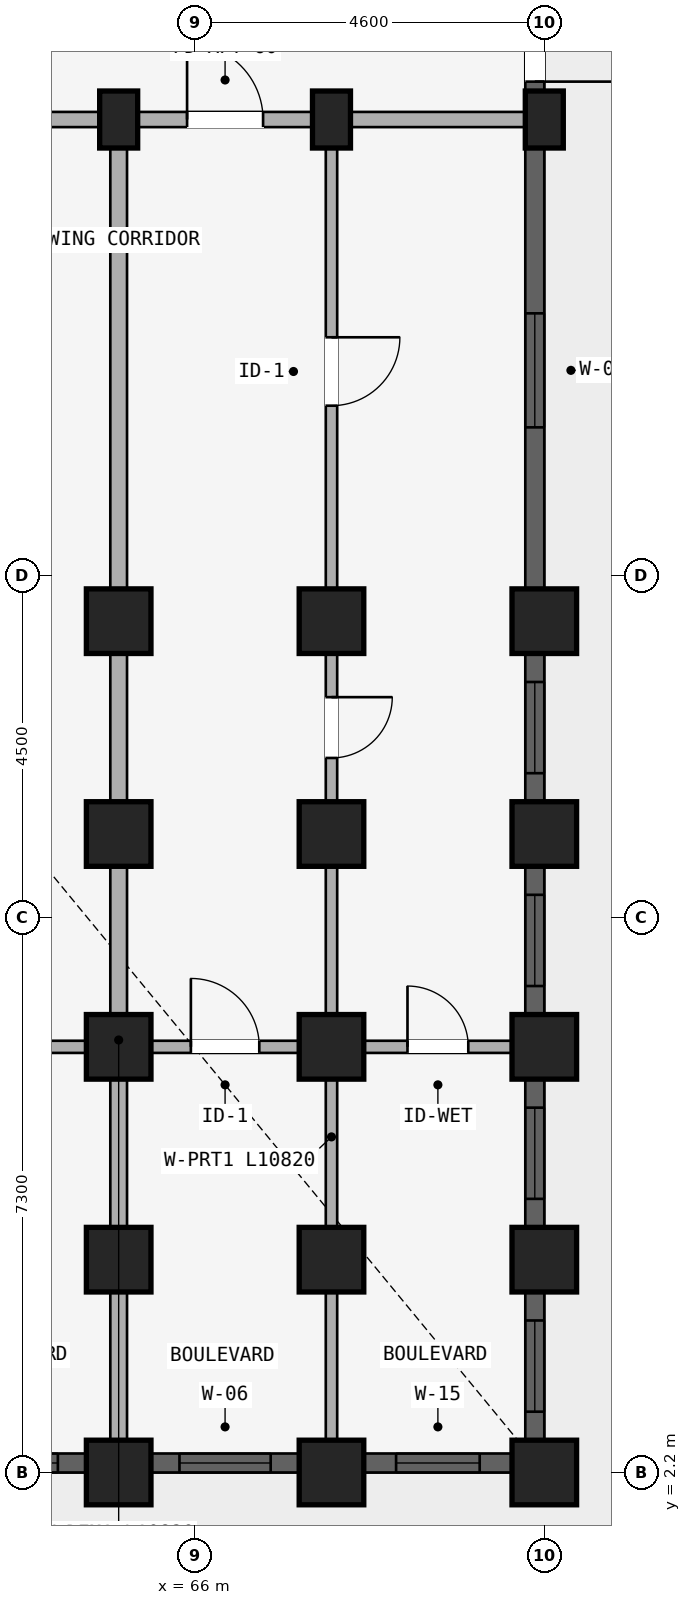
"""IFC4 building model, lengths in metres.
Left out: names, types, materials, properties, quantities, classifications, styles, units other than length and angle.
Written with IfcOpenShell. Run it as: python <this file> out.ifc"""

import sys

from ifc_helpers import new_model, si_unit, direction, frame, frame_2d, origin, origin_2d, place, context, subcontext, project, spatial, rectangle, extrude, element, fill, save


model = new_model("IFC4")
c1 = context("Model", 3, precision=1e-05, world=origin(), true_north=direction((0.0, 1.0)))
c2 = subcontext(c1, "Body", "Model", "MODEL_VIEW")
j1 = project(units=[si_unit("LENGTHUNIT", "METRE"), si_unit("PLANEANGLEUNIT", "RADIAN")], contexts=[c1])
p1 = place(None, origin())
s1 = spatial("IfcSite", under=j1, at=p1, CompositionType="ELEMENT")
p2 = place(p1, origin())
s2 = spatial("IfcBuilding", under=s1, at=p2, CompositionType="ELEMENT")
p3 = place(p2, origin())
s3 = spatial("IfcBuildingStorey", under=s2, at=p3, CompositionType="ELEMENT", Elevation=0.0)
p4 = place(p3, frame((65.0, 20.0, 0.0), z_axis=(0.0, 0.0, 1.0), x_axis=(1.0, 0.0, 0.0)))
e1 = element("IfcColumn", 1, at=p4, inside=s3, PredefinedType="COLUMN", context=c2, shape_type="SweptSolid", body=[
    extrude(rectangle(XDim=0.5, YDim=0.75, at=origin_2d()), origin(), (0.0, 0.0, 1.0), 4.15),
])
for number, where, z_axis, x_axis in (
    (2, (65.0, 13.4, 0.0), (0.0, 0.0, 1.0), (1.0, 0.0, 0.0)),
    (3, (65.0, 10.6, 0.0), (0.0, 0.0, 1.0), (1.0, 0.0, 0.0)),
    (4, (65.0, 7.8, 0.0), (0.0, 0.0, 1.0), (1.0, 0.0, 0.0)),
    (5, (65.0, 5.0, 0.0), (0.0, 0.0, 1.0), (1.0, 0.0, 0.0)),
    (6, (65.0, 2.2, 0.0), (0.0, 0.0, 1.0), (1.0, 0.0, 0.0)),
):
    element("IfcColumn", number, at=place(p3, frame(where, z_axis=z_axis, x_axis=x_axis)), inside=s3, PredefinedType="COLUMN", context=c2, shape_type="SweptSolid", body=[
        extrude(rectangle(XDim=0.85, YDim=0.85, at=origin_2d()), origin(), (0.0, 0.0, 1.0), 4.15),
    ])
p5 = place(p3, frame((67.8, 20.0, 0.0), z_axis=(0.0, 0.0, 1.0), x_axis=(1.0, 0.0, 0.0)))
e7 = element("IfcColumn", 7, at=p5, inside=s3, PredefinedType="COLUMN", context=c2, shape_type="SweptSolid", body=[
    extrude(rectangle(XDim=0.5, YDim=0.75, at=origin_2d()), origin(), (0.0, 0.0, 1.0), 4.15),
])
for number, where, z_axis, x_axis in (
    (8, (67.8, 13.4, 0.0), (0.0, 0.0, 1.0), (1.0, 0.0, 0.0)),
    (9, (67.8, 10.6, 0.0), (0.0, 0.0, 1.0), (1.0, 0.0, 0.0)),
    (10, (67.8, 7.8, 0.0), (0.0, 0.0, 1.0), (1.0, 0.0, 0.0)),
    (11, (67.8, 5.0, 0.0), (0.0, 0.0, 1.0), (1.0, 0.0, 0.0)),
    (12, (67.8, 2.2, 0.0), (0.0, 0.0, 1.0), (1.0, 0.0, 0.0)),
):
    element("IfcColumn", number, at=place(p3, frame(where, z_axis=z_axis, x_axis=x_axis)), inside=s3, PredefinedType="COLUMN", context=c2, shape_type="SweptSolid", body=[
        extrude(rectangle(XDim=0.85, YDim=0.85, at=origin_2d()), origin(), (0.0, 0.0, 1.0), 4.15),
    ])
p6 = place(p3, frame((70.6, 20.0, 0.0), z_axis=(0.0, 0.0, 1.0), x_axis=(1.0, 0.0, 0.0)))
e13 = element("IfcColumn", 13, at=p6, inside=s3, PredefinedType="COLUMN", context=c2, shape_type="SweptSolid", body=[
    extrude(rectangle(XDim=0.5, YDim=0.75, at=origin_2d()), origin(), (0.0, 0.0, 1.0), 4.15),
])
for number, where, z_axis, x_axis in (
    (14, (70.6, 13.4, 0.0), (0.0, 0.0, 1.0), (1.0, 0.0, 0.0)),
    (15, (70.6, 10.6, 0.0), (0.0, 0.0, 1.0), (1.0, 0.0, 0.0)),
    (16, (70.6, 7.8, 0.0), (0.0, 0.0, 1.0), (1.0, 0.0, 0.0)),
    (17, (70.6, 5.0, 0.0), (0.0, 0.0, 1.0), (1.0, 0.0, 0.0)),
    (18, (70.6, 2.2, 0.0), (0.0, 0.0, 1.0), (1.0, 0.0, 0.0)),
):
    element("IfcColumn", number, at=place(p3, frame(where, z_axis=z_axis, x_axis=x_axis)), inside=s3, PredefinedType="COLUMN", context=c2, shape_type="SweptSolid", body=[
        extrude(rectangle(XDim=0.85, YDim=0.85, at=origin_2d()), origin(), (0.0, 0.0, 1.0), 4.15),
    ])
p7 = place(p3, frame((62.2, 20.0, 0.0), z_axis=(0.0, 0.0, 1.0), x_axis=(1.0, 0.0, 0.0)))
e19 = element("IfcWall", 19, at=p7, inside=s3, PredefinedType="STANDARD", context=c2, shape_type="SweptSolid", body=[
    extrude(rectangle(XDim=2.8, YDim=0.2, at=frame_2d((1.4, 0.0))), origin(), (0.0, 0.0, 1.0), 3.492),
])
p8 = place(p3, frame((62.28, 7.8, 0.0), z_axis=(0.0, 0.0, 1.0), x_axis=(1.0, 0.0, 0.0)))
e20 = element("IfcWall", 20, at=p8, inside=s3, PredefinedType="PLUMBINGWALL", context=c2, shape_type="SweptSolid", body=[
    extrude(rectangle(XDim=2.64, YDim=0.16, at=frame_2d((1.32, 0.0))), origin(), (0.0, 0.0, 1.0), 3.492),
])
p9 = place(p8, frame((0.92, 0.0, 0.0)))
e21 = element("IfcOpeningElement", 21, at=p9, cuts=e20, PredefinedType="OPENING", context=c2, shape_type="SweptSolid", body=[
    extrude(rectangle(XDim=0.8, YDim=2.1, at=frame_2d((0.4, 1.05))), frame((0.0, 0.09, 0.0), z_axis=(0.0, -1.0, 0.0), x_axis=(1.0, 0.0, 0.0)), (0.0, 0.0, 1.0), 0.18),
])
p10 = place(p3, frame((65.0, 20.0, 0.0), z_axis=(0.0, 0.0, 1.0), x_axis=(1.0, 0.0, 0.0)))
e22 = element("IfcWall", 22, at=p10, inside=s3, PredefinedType="STANDARD", context=c2, shape_type="SweptSolid", body=[
    extrude(rectangle(XDim=2.8, YDim=0.2, at=frame_2d((1.4, 0.0))), origin(), (0.0, 0.0, 1.0), 3.492),
])
p11 = place(p10, frame((0.9, 0.0, 0.0)))
e23 = element("IfcOpeningElement", 23, at=p11, cuts=e22, PredefinedType="OPENING", context=c2, shape_type="SweptSolid", body=[
    extrude(rectangle(XDim=1.0, YDim=2.15, at=frame_2d((0.5, 1.075))), frame((0.0, 0.11, 0.0), z_axis=(0.0, -1.0, 0.0), x_axis=(1.0, 0.0, 0.0)), (0.0, 0.0, 1.0), 0.22),
])
p12 = place(p3, frame((65.08, 7.8, 0.0), z_axis=(0.0, 0.0, 1.0), x_axis=(1.0, 0.0, 0.0)))
e24 = element("IfcWall", 24, at=p12, inside=s3, PredefinedType="PLUMBINGWALL", context=c2, shape_type="SweptSolid", body=[
    extrude(rectangle(XDim=2.64, YDim=0.16, at=frame_2d((1.32, 0.0))), origin(), (0.0, 0.0, 1.0), 3.492),
])
p13 = place(p12, frame((0.87, 0.0, 0.0)))
e25 = element("IfcOpeningElement", 25, at=p13, cuts=e24, PredefinedType="OPENING", context=c2, shape_type="SweptSolid", body=[
    extrude(rectangle(XDim=0.9, YDim=2.1, at=frame_2d((0.45, 1.05))), frame((0.0, 0.09, 0.0), z_axis=(0.0, -1.0, 0.0), x_axis=(1.0, 0.0, 0.0)), (0.0, 0.0, 1.0), 0.18),
])
p14 = place(p3, frame((67.8, 20.0, 0.0), z_axis=(0.0, 0.0, 1.0), x_axis=(1.0, 0.0, 0.0)))
e26 = element("IfcWall", 26, at=p14, inside=s3, PredefinedType="STANDARD", context=c2, shape_type="SweptSolid", body=[
    extrude(rectangle(XDim=2.8, YDim=0.2, at=frame_2d((1.4, 0.0))), origin(), (0.0, 0.0, 1.0), 3.492),
])
p15 = place(p3, frame((67.88, 7.8, 0.0), z_axis=(0.0, 0.0, 1.0), x_axis=(1.0, 0.0, 0.0)))
e27 = element("IfcWall", 27, at=p15, inside=s3, PredefinedType="PLUMBINGWALL", context=c2, shape_type="SweptSolid", body=[
    extrude(rectangle(XDim=2.64, YDim=0.16, at=frame_2d((1.32, 0.0))), origin(), (0.0, 0.0, 1.0), 3.492),
])
p16 = place(p15, frame((0.92, 0.0, 0.0)))
e28 = element("IfcOpeningElement", 28, at=p16, cuts=e27, PredefinedType="OPENING", context=c2, shape_type="SweptSolid", body=[
    extrude(rectangle(XDim=0.8, YDim=2.1, at=frame_2d((0.4, 1.05))), frame((0.0, 0.09, 0.0), z_axis=(0.0, -1.0, 0.0), x_axis=(1.0, 0.0, 0.0)), (0.0, 0.0, 1.0), 0.18),
])
p17 = place(p3, frame((65.0, 19.95, 0.0), z_axis=(0.0, 0.0, 1.0), x_axis=(0.0, -1.0, 0.0)))
e29 = element("IfcWall", 29, at=p17, inside=s3, PredefinedType="STANDARD", context=c2, shape_type="SweptSolid", body=[
    extrude(rectangle(XDim=6.53, YDim=0.22, at=frame_2d((3.265, 0.0))), origin(), (0.0, 0.0, 1.0), 3.492),
])
p18 = place(p3, frame((65.0, 13.3, 0.0), z_axis=(0.0, 0.0, 1.0), x_axis=(0.0, -1.0, 0.0)))
e30 = element("IfcWall", 30, at=p18, inside=s3, PredefinedType="STANDARD", context=c2, shape_type="SweptSolid", body=[
    extrude(rectangle(XDim=10.82, YDim=0.22, at=frame_2d((5.41, 0.0))), origin(), (0.0, 0.0, 1.0), 3.492),
])
p19 = place(p3, frame((67.8, 19.95, 0.0), z_axis=(0.0, 0.0, 1.0), x_axis=(0.0, -1.0, 0.0)))
e31 = element("IfcWall", 31, at=p19, inside=s3, PredefinedType="PARTITIONING", context=c2, shape_type="SweptSolid", body=[
    extrude(rectangle(XDim=6.53, YDim=0.15, at=frame_2d((3.265, 0.0))), origin(), (0.0, 0.0, 1.0), 3.492),
])
p20 = place(p19, frame((2.815, 0.0, 0.0)))
e32 = element("IfcOpeningElement", 32, at=p20, cuts=e31, PredefinedType="OPENING", context=c2, shape_type="SweptSolid", body=[
    extrude(rectangle(XDim=0.9, YDim=2.1, at=frame_2d((0.45, 1.05))), frame((0.0, 0.085, 0.0), z_axis=(0.0, -1.0, 0.0), x_axis=(1.0, 0.0, 0.0)), (0.0, 0.0, 1.0), 0.17),
])
p21 = place(p3, frame((67.8, 13.3, 0.0), z_axis=(0.0, 0.0, 1.0), x_axis=(0.0, -1.0, 0.0)))
e33 = element("IfcWall", 33, at=p21, inside=s3, PredefinedType="PARTITIONING", context=c2, shape_type="SweptSolid", body=[
    extrude(rectangle(XDim=10.82, YDim=0.15, at=frame_2d((5.41, 0.0))), origin(), (0.0, 0.0, 1.0), 3.492),
])
p22 = place(p21, frame((0.899, 0.0, 0.0)))
e34 = element("IfcOpeningElement", 34, at=p22, cuts=e33, PredefinedType="OPENING", context=c2, shape_type="SweptSolid", body=[
    extrude(rectangle(XDim=0.8, YDim=2.1, at=frame_2d((0.4, 1.05))), frame((0.0, 0.085, 0.0), z_axis=(0.0, -1.0, 0.0), x_axis=(1.0, 0.0, 0.0)), (0.0, 0.0, 1.0), 0.17),
])
p23 = place(p3, frame((62.628, 2.325, 0.0), z_axis=(0.0, 0.0, 1.0), x_axis=(1.0, 0.0, 0.0)))
e35 = element("IfcWall", 35, at=p23, inside=s3, PredefinedType="STANDARD", context=c2, shape_type="SweptSolid", body=[
    extrude(rectangle(XDim=1.943, YDim=0.25, at=frame_2d((0.972, 0.0))), origin(), (0.0, 0.0, 1.0), 3.692),
])
p24 = place(p23, frame((0.372, 0.0, 0.88)))
e36 = element("IfcOpeningElement", 36, at=p24, cuts=e35, PredefinedType="OPENING", context=c2, shape_type="SweptSolid", body=[
    extrude(rectangle(XDim=1.2, YDim=1.5, at=frame_2d((0.6, 0.75))), frame((0.0, 0.135, 0.0), z_axis=(0.0, -1.0, 0.0), x_axis=(1.0, 0.0, 0.0)), (0.0, 0.0, 1.0), 0.27),
])
p25 = place(p3, frame((65.428, 2.325, 0.0), z_axis=(0.0, 0.0, 1.0), x_axis=(1.0, 0.0, 0.0)))
e37 = element("IfcWall", 37, at=p25, inside=s3, PredefinedType="STANDARD", context=c2, shape_type="SweptSolid", body=[
    extrude(rectangle(XDim=1.943, YDim=0.25, at=frame_2d((0.972, 0.0))), origin(), (0.0, 0.0, 1.0), 3.692),
])
p26 = place(p25, frame((0.372, 0.0, 0.88)))
e38 = element("IfcOpeningElement", 38, at=p26, cuts=e37, PredefinedType="OPENING", context=c2, shape_type="SweptSolid", body=[
    extrude(rectangle(XDim=1.2, YDim=1.5, at=frame_2d((0.6, 0.75))), frame((0.0, 0.135, 0.0), z_axis=(0.0, -1.0, 0.0), x_axis=(1.0, 0.0, 0.0)), (0.0, 0.0, 1.0), 0.27),
])
p27 = place(p3, frame((68.229, 2.325, 0.0), z_axis=(0.0, 0.0, 1.0), x_axis=(1.0, 0.0, 0.0)))
e39 = element("IfcWall", 39, at=p27, inside=s3, PredefinedType="STANDARD", context=c2, shape_type="SweptSolid", body=[
    extrude(rectangle(XDim=1.943, YDim=0.25, at=frame_2d((0.971, 0.0))), origin(), (0.0, 0.0, 1.0), 3.692),
])
p28 = place(p27, frame((0.421, 0.0, 0.88)))
e40 = element("IfcOpeningElement", 40, at=p28, cuts=e39, PredefinedType="OPENING", context=c2, shape_type="SweptSolid", body=[
    extrude(rectangle(XDim=1.1, YDim=1.45, at=frame_2d((0.55, 0.725))), frame((0.0, 0.135, 0.0), z_axis=(0.0, -1.0, 0.0), x_axis=(1.0, 0.0, 0.0)), (0.0, 0.0, 1.0), 0.27),
])
p29 = place(p3, frame((70.475, 22.021, 0.0), z_axis=(0.0, 0.0, 1.0), x_axis=(0.0, -1.0, 0.0)))
e41 = element("IfcWall", 41, at=p29, inside=s3, PredefinedType="STANDARD", context=c2, shape_type="SweptSolid", body=[
    extrude(rectangle(XDim=1.643, YDim=0.25, at=frame_2d((0.822, 0.0))), origin(), (0.0, 0.0, 1.0), 3.492),
])
p30 = place(p29, frame((0.123, 0.0, 0.0)))
e42 = element("IfcOpeningElement", 42, at=p30, cuts=e41, PredefinedType="OPENING", context=c2, shape_type="SweptSolid", body=[
    extrude(rectangle(XDim=1.4, YDim=2.15, at=frame_2d((0.7, 1.075))), frame((0.0, 0.135, 0.0), z_axis=(0.0, -1.0, 0.0), x_axis=(1.0, 0.0, 0.0)), (0.0, 0.0, 1.0), 0.27),
])
p31 = place(p3, frame((70.475, 19.622, 0.0), z_axis=(0.0, 0.0, 1.0), x_axis=(0.0, -1.0, 0.0)))
e43 = element("IfcWall", 43, at=p31, inside=s3, PredefinedType="STANDARD", context=c2, shape_type="SweptSolid", body=[
    extrude(rectangle(XDim=5.802, YDim=0.25, at=frame_2d((2.901, 0.0))), origin(), (0.0, 0.0, 1.0), 3.492),
])
p32 = place(p31, frame((2.171, 0.0, 0.88)))
e44 = element("IfcOpeningElement", 44, at=p32, cuts=e43, PredefinedType="OPENING", context=c2, shape_type="SweptSolid", body=[
    extrude(rectangle(XDim=1.5, YDim=1.65, at=frame_2d((0.75, 0.825))), frame((0.0, 0.135, 0.0), z_axis=(0.0, -1.0, 0.0), x_axis=(1.0, 0.0, 0.0)), (0.0, 0.0, 1.0), 0.27),
])
p33 = place(p3, frame((70.475, 12.98, 0.0), z_axis=(0.0, 0.0, 1.0), x_axis=(0.0, -1.0, 0.0)))
e45 = element("IfcWall", 45, at=p33, inside=s3, PredefinedType="STANDARD", context=c2, shape_type="SweptSolid", body=[
    extrude(rectangle(XDim=1.96, YDim=0.25, at=frame_2d((0.98, 0.0))), origin(), (0.0, 0.0, 1.0), 3.492),
])
p34 = place(p33, frame((0.38, 0.0, 0.88)))
e46 = element("IfcOpeningElement", 46, at=p34, cuts=e45, PredefinedType="OPENING", context=c2, shape_type="SweptSolid", body=[
    extrude(rectangle(XDim=1.2, YDim=1.5, at=frame_2d((0.6, 0.75))), frame((0.0, 0.135, 0.0), z_axis=(0.0, -1.0, 0.0), x_axis=(1.0, 0.0, 0.0)), (0.0, 0.0, 1.0), 0.27),
])
p35 = place(p3, frame((70.475, 10.18, 0.0), z_axis=(0.0, 0.0, 1.0), x_axis=(0.0, -1.0, 0.0)))
e47 = element("IfcWall", 47, at=p35, inside=s3, PredefinedType="STANDARD", context=c2, shape_type="SweptSolid", body=[
    extrude(rectangle(XDim=1.96, YDim=0.25, at=frame_2d((0.98, 0.0))), origin(), (0.0, 0.0, 1.0), 3.492),
])
p36 = place(p35, frame((0.38, 0.0, 0.88)))
e48 = element("IfcOpeningElement", 48, at=p36, cuts=e47, PredefinedType="OPENING", context=c2, shape_type="SweptSolid", body=[
    extrude(rectangle(XDim=1.2, YDim=1.5, at=frame_2d((0.6, 0.75))), frame((0.0, 0.135, 0.0), z_axis=(0.0, -1.0, 0.0), x_axis=(1.0, 0.0, 0.0)), (0.0, 0.0, 1.0), 0.27),
])
p37 = place(p3, frame((70.475, 7.38, 0.0), z_axis=(0.0, 0.0, 1.0), x_axis=(0.0, -1.0, 0.0)))
e49 = element("IfcWall", 49, at=p37, inside=s3, PredefinedType="STANDARD", context=c2, shape_type="SweptSolid", body=[
    extrude(rectangle(XDim=1.96, YDim=0.25, at=frame_2d((0.98, 0.0))), origin(), (0.0, 0.0, 1.0), 3.492),
])
p38 = place(p37, frame((0.38, 0.0, 0.88)))
e50 = element("IfcOpeningElement", 50, at=p38, cuts=e49, PredefinedType="OPENING", context=c2, shape_type="SweptSolid", body=[
    extrude(rectangle(XDim=1.2, YDim=1.5, at=frame_2d((0.6, 0.75))), frame((0.0, 0.135, 0.0), z_axis=(0.0, -1.0, 0.0), x_axis=(1.0, 0.0, 0.0)), (0.0, 0.0, 1.0), 0.27),
])
p39 = place(p3, frame((70.475, 4.58, 0.0), z_axis=(0.0, 0.0, 1.0), x_axis=(0.0, -1.0, 0.0)))
e51 = element("IfcWall", 51, at=p39, inside=s3, PredefinedType="STANDARD", context=c2, shape_type="SweptSolid", body=[
    extrude(rectangle(XDim=1.96, YDim=0.25, at=frame_2d((0.98, 0.0))), origin(), (0.0, 0.0, 1.0), 3.492),
])
p40 = place(p39, frame((0.38, 0.0, 0.88)))
e52 = element("IfcOpeningElement", 52, at=p40, cuts=e51, PredefinedType="OPENING", context=c2, shape_type="SweptSolid", body=[
    extrude(rectangle(XDim=1.2, YDim=1.5, at=frame_2d((0.6, 0.75))), frame((0.0, 0.135, 0.0), z_axis=(0.0, -1.0, 0.0), x_axis=(1.0, 0.0, 0.0)), (0.0, 0.0, 1.0), 0.27),
])
p41 = place(p24, origin())
e53 = element("IfcWindow", 53, at=p41, inside=s3, PartitioningType="SINGLE_PANEL", PredefinedType="WINDOW", context=c2, shape_type="SweptSolid", body=[
    extrude(rectangle(XDim=1.2, YDim=1.5, at=frame_2d((0.6, 0.75))), frame((0.0, 0.03, 0.0), z_axis=(0.0, -1.0, 0.0), x_axis=(1.0, 0.0, 0.0)), (0.0, 0.0, 1.0), 0.06),
])
fill(e36, e53)
p42 = place(p26, origin())
e54 = element("IfcWindow", 54, at=p42, inside=s3, PartitioningType="SINGLE_PANEL", PredefinedType="WINDOW", context=c2, shape_type="SweptSolid", body=[
    extrude(rectangle(XDim=1.2, YDim=1.5, at=frame_2d((0.6, 0.75))), frame((0.0, 0.03, 0.0), z_axis=(0.0, -1.0, 0.0), x_axis=(1.0, 0.0, 0.0)), (0.0, 0.0, 1.0), 0.06),
])
fill(e38, e54)
p43 = place(p28, origin())
e55 = element("IfcWindow", 55, at=p43, inside=s3, PartitioningType="SINGLE_PANEL", PredefinedType="WINDOW", context=c2, shape_type="SweptSolid", body=[
    extrude(rectangle(XDim=1.1, YDim=1.45, at=frame_2d((0.55, 0.725))), frame((0.0, 0.03, 0.0), z_axis=(0.0, -1.0, 0.0), x_axis=(1.0, 0.0, 0.0)), (0.0, 0.0, 1.0), 0.06),
])
fill(e40, e55)
p44 = place(p32, origin())
e56 = element("IfcWindow", 56, at=p44, inside=s3, PartitioningType="DOUBLE_PANEL_VERTICAL", PredefinedType="WINDOW", context=c2, shape_type="SweptSolid", body=[
    extrude(rectangle(XDim=1.5, YDim=1.65, at=frame_2d((0.75, 0.825))), frame((0.0, 0.03, 0.0), z_axis=(0.0, -1.0, 0.0), x_axis=(1.0, 0.0, 0.0)), (0.0, 0.0, 1.0), 0.06),
])
fill(e44, e56)
p45 = place(p34, origin())
e57 = element("IfcWindow", 57, at=p45, inside=s3, PartitioningType="SINGLE_PANEL", PredefinedType="WINDOW", context=c2, shape_type="SweptSolid", body=[
    extrude(rectangle(XDim=1.2, YDim=1.5, at=frame_2d((0.6, 0.75))), frame((0.0, 0.03, 0.0), z_axis=(0.0, -1.0, 0.0), x_axis=(1.0, 0.0, 0.0)), (0.0, 0.0, 1.0), 0.06),
])
fill(e46, e57)
p46 = place(p36, origin())
e58 = element("IfcWindow", 58, at=p46, inside=s3, PartitioningType="SINGLE_PANEL", PredefinedType="WINDOW", context=c2, shape_type="SweptSolid", body=[
    extrude(rectangle(XDim=1.2, YDim=1.5, at=frame_2d((0.6, 0.75))), frame((0.0, 0.03, 0.0), z_axis=(0.0, -1.0, 0.0), x_axis=(1.0, 0.0, 0.0)), (0.0, 0.0, 1.0), 0.06),
])
fill(e48, e58)
p47 = place(p38, origin())
e59 = element("IfcWindow", 59, at=p47, inside=s3, PartitioningType="SINGLE_PANEL", PredefinedType="WINDOW", context=c2, shape_type="SweptSolid", body=[
    extrude(rectangle(XDim=1.2, YDim=1.5, at=frame_2d((0.6, 0.75))), frame((0.0, 0.03, 0.0), z_axis=(0.0, -1.0, 0.0), x_axis=(1.0, 0.0, 0.0)), (0.0, 0.0, 1.0), 0.06),
])
fill(e50, e59)
p48 = place(p40, origin())
e60 = element("IfcWindow", 60, at=p48, inside=s3, PartitioningType="SINGLE_PANEL", PredefinedType="WINDOW", context=c2, shape_type="SweptSolid", body=[
    extrude(rectangle(XDim=1.2, YDim=1.5, at=frame_2d((0.6, 0.75))), frame((0.0, 0.03, 0.0), z_axis=(0.0, -1.0, 0.0), x_axis=(1.0, 0.0, 0.0)), (0.0, 0.0, 1.0), 0.06),
])
fill(e52, e60)
p49 = place(p13, origin())
e61 = element("IfcDoor", 61, at=p49, inside=s3, OperationType="SINGLE_SWING_LEFT", PredefinedType="DOOR", context=c2, shape_type="SweptSolid", body=[
    extrude(rectangle(XDim=0.9, YDim=2.1, at=frame_2d((0.45, 1.05))), frame((0.0, 0.025, 0.0), z_axis=(0.0, -1.0, 0.0), x_axis=(1.0, 0.0, 0.0)), (0.0, 0.0, 1.0), 0.05),
])
fill(e25, e61)
p50 = place(p11, frame((1.0, 0.0, 0.0), z_axis=(0.0, 0.0, 1.0), x_axis=(-1.0, 0.0, 0.0)))
e62 = element("IfcDoor", 62, at=p50, inside=s3, OperationType="SINGLE_SWING_RIGHT", PredefinedType="DOOR", context=c2, shape_type="SweptSolid", body=[
    extrude(rectangle(XDim=1.0, YDim=2.15, at=frame_2d((0.5, 1.075))), frame((0.0, 0.025, 0.0), z_axis=(0.0, -1.0, 0.0), x_axis=(1.0, 0.0, 0.0)), (0.0, 0.0, 1.0), 0.05),
])
fill(e23, e62)
p51 = place(p16, origin())
e63 = element("IfcDoor", 63, at=p51, inside=s3, OperationType="SINGLE_SWING_LEFT", PredefinedType="DOOR", context=c2, shape_type="SweptSolid", body=[
    extrude(rectangle(XDim=0.8, YDim=2.1, at=frame_2d((0.4, 1.05))), frame((0.0, 0.025, 0.0), z_axis=(0.0, -1.0, 0.0), x_axis=(1.0, 0.0, 0.0)), (0.0, 0.0, 1.0), 0.05),
])
fill(e28, e63)
p52 = place(p20, origin())
e64 = element("IfcDoor", 64, at=p52, inside=s3, OperationType="SINGLE_SWING_LEFT", PredefinedType="DOOR", context=c2, shape_type="SweptSolid", body=[
    extrude(rectangle(XDim=0.9, YDim=2.1, at=frame_2d((0.45, 1.05))), frame((0.0, 0.025, 0.0), z_axis=(0.0, -1.0, 0.0), x_axis=(1.0, 0.0, 0.0)), (0.0, 0.0, 1.0), 0.05),
])
fill(e32, e64)
p53 = place(p22, frame((0.8, 0.0, 0.0), z_axis=(0.0, 0.0, 1.0), x_axis=(-1.0, 0.0, 0.0)))
e65 = element("IfcDoor", 65, at=p53, inside=s3, OperationType="SINGLE_SWING_RIGHT", PredefinedType="DOOR", context=c2, shape_type="SweptSolid", body=[
    extrude(rectangle(XDim=0.8, YDim=2.1, at=frame_2d((0.4, 1.05))), frame((0.0, 0.025, 0.0), z_axis=(0.0, -1.0, 0.0), x_axis=(1.0, 0.0, 0.0)), (0.0, 0.0, 1.0), 0.05),
])
fill(e34, e65)
p54 = place(p30, origin())
e66 = element("IfcDoor", 66, at=p54, inside=s3, OperationType="SINGLE_SWING_RIGHT", PredefinedType="DOOR", context=c2, shape_type="SweptSolid", body=[
    extrude(rectangle(XDim=1.4, YDim=2.15, at=frame_2d((0.7, 1.075))), frame((0.0, 0.025, 0.0), z_axis=(0.0, -1.0, 0.0), x_axis=(1.0, 0.0, 0.0)), (0.0, 0.0, 1.0), 0.05),
])
fill(e42, e66)
save(model, sys.argv[1])
